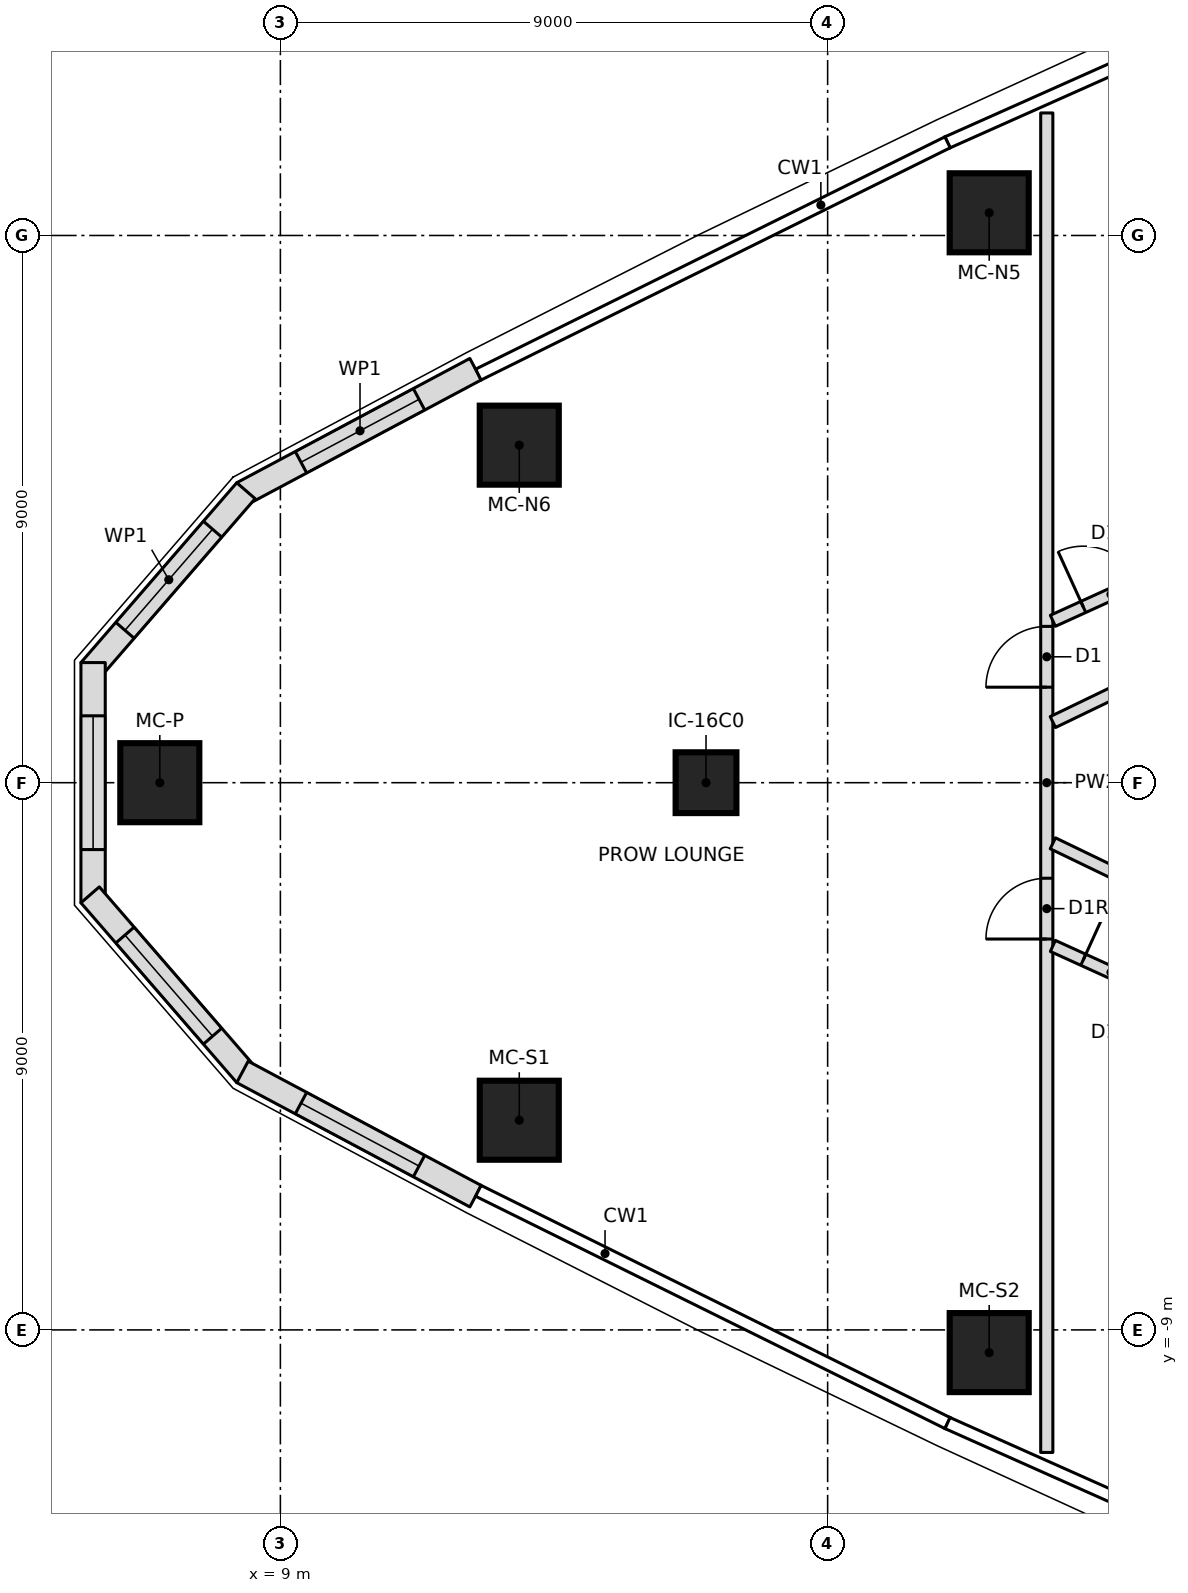
"""IFC4 building model, lengths in metres.
Left out: names, types, materials, properties, quantities, classifications, styles, units other than length and angle.
Written with IfcOpenShell. Run it as: python <this file> out.ifc"""

import sys

from ifc_helpers import new_model, si_unit, direction, frame, frame_2d, origin, origin_2d, place, context, subcontext, project, spatial, polyline, rectangle, outline, extrude, element, fill, save


model = new_model("IFC4")
c1 = context("Model", 3, precision=1e-05, world=origin(), true_north=direction((0.0, 1.0)))
c2 = subcontext(c1, "Body", "Model", "MODEL_VIEW")
j1 = project(units=[si_unit("LENGTHUNIT", "METRE"), si_unit("PLANEANGLEUNIT", "RADIAN")], contexts=[c1])
p1 = place(None, origin())
s1 = spatial("IfcSite", under=j1, at=p1, CompositionType="ELEMENT")
p2 = place(p1, origin())
s2 = spatial("IfcBuilding", under=s1, at=p2, CompositionType="ELEMENT")
p3 = place(p2, frame((0.0, 0.0, 193.25)))
s3 = spatial("IfcBuildingStorey", under=s2, at=p3, CompositionType="ELEMENT", Elevation=193.25)
for number, where, z_axis, x_axis in (
    (1, (7.017, 0.0, 0.0), (0.0, 0.0, 1.0), (1.0, 0.0, 0.0)),
    (2, (12.929, -5.552, 0.0), (0.0, 0.0, 1.0), (1.0, 0.0, 0.0)),
    (3, (20.657, -9.373, 0.0), (0.0, 0.0, 1.0), (1.0, 0.0, 0.0)),
    (4, (20.657, 9.373, 0.0), (0.0, 0.0, 1.0), (1.0, 0.0, 0.0)),
    (5, (12.929, 5.552, 0.0), (0.0, 0.0, 1.0), (1.0, 0.0, 0.0)),
):
    element("IfcColumn", number, at=place(p3, frame(where, z_axis=z_axis, x_axis=x_axis)), inside=s3, PredefinedType="COLUMN", context=c2, shape_type="SweptSolid", body=[
        extrude(rectangle(XDim=1.3, YDim=1.3, at=origin_2d()), origin(), (0.0, 0.0, 1.0), 3.55),
    ])
p4 = place(p3, frame((16.0, 0.0, 0.0), z_axis=(0.0, 0.0, 1.0), x_axis=(1.0, 0.0, 0.0)))
e6 = element("IfcColumn", 6, at=p4, inside=s3, PredefinedType="COLUMN", context=c2, shape_type="SweptSolid", body=[
    extrude(rectangle(XDim=1.0, YDim=1.0, at=origin_2d()), origin(), (0.0, 0.0, 1.0), 3.55),
])
p5 = place(p3, frame((12.21, 6.801, 0.0), z_axis=(0.0, 0.0, 1.0), x_axis=(-0.882385889746, -0.470526451518, 0.0)))
e7 = element("IfcWall", 7, at=p5, inside=s3, PredefinedType="NOTDEFINED", context=c2, shape_type="SweptSolid", body=[
    extrude(outline(polyline([(0.0, -0.2), (4.344, -0.2), (4.27, 0.2), (0.0, 0.2), (0.0, -0.2)])), origin(), (0.0, 0.0, 1.0), 3.25),
])
p6 = place(p5, frame((1.053, 0.0, 0.6)))
e8 = element("IfcOpeningElement", 8, at=p6, cuts=e7, PredefinedType="OPENING", context=c2, shape_type="SweptSolid", body=[
    extrude(outline(polyline([(0.0, 1.35), (0.084, 1.771), (0.322, 2.128), (0.679, 2.366), (1.1, 2.45), (1.521, 2.366), (1.878, 2.128), (2.116, 1.771), (2.2, 1.35), (2.2, 1.1), (2.116, 0.679), (1.878, 0.322), (1.521, 0.084), (1.1, 0.0), (0.679, 0.084), (0.322, 0.322), (0.084, 0.679), (0.0, 1.1), (0.0, 1.35)])), frame((0.0, 0.21, 0.0), z_axis=(0.0, -1.0, 0.0), x_axis=(1.0, 0.0, 0.0)), (0.0, 0.0, 1.0), 0.42),
])
p7 = place(p3, frame((8.409, 4.774, 0.0), z_axis=(0.0, 0.0, 1.0), x_axis=(-0.654759384203, -0.755837382509, 0.0)))
e9 = element("IfcWall", 9, at=p7, inside=s3, PredefinedType="NOTDEFINED", context=c2, shape_type="SweptSolid", body=[
    extrude(outline(polyline([(-0.037, -0.2), (3.876, -0.2), (3.727, 0.2), (0.037, 0.2), (-0.037, -0.2)])), origin(), (0.0, 0.0, 1.0), 3.25),
])
p8 = place(p7, frame((0.801, 0.0, 0.6)))
e10 = element("IfcOpeningElement", 10, at=p8, cuts=e9, PredefinedType="OPENING", context=c2, shape_type="SweptSolid", body=[
    extrude(outline(polyline([(0.0, 1.35), (0.084, 1.771), (0.322, 2.128), (0.679, 2.366), (1.1, 2.45), (1.521, 2.366), (1.878, 2.128), (2.116, 1.771), (2.2, 1.35), (2.2, 1.1), (2.116, 0.679), (1.878, 0.322), (1.521, 0.084), (1.1, 0.0), (0.679, 0.084), (0.322, 0.322), (0.084, 0.679), (0.0, 1.1), (0.0, 1.35)])), frame((0.0, 0.21, 0.0), z_axis=(0.0, -1.0, 0.0), x_axis=(1.0, 0.0, 0.0)), (0.0, 0.0, 1.0), 0.42),
])
p9 = place(p3, frame((5.92, 1.901, 0.0), z_axis=(0.0, 0.0, 1.0), x_axis=(0.0, -1.0, 0.0)))
e11 = element("IfcWall", 11, at=p9, inside=s3, PredefinedType="NOTDEFINED", context=c2, shape_type="SweptSolid", body=[
    extrude(outline(polyline([(-0.075, -0.2), (3.876, -0.2), (3.727, 0.2), (0.075, 0.2), (-0.075, -0.2)])), origin(), (0.0, 0.0, 1.0), 3.25),
])
p10 = place(p9, frame((0.801, 0.0, 0.6)))
e12 = element("IfcOpeningElement", 12, at=p10, cuts=e11, PredefinedType="OPENING", context=c2, shape_type="SweptSolid", body=[
    extrude(outline(polyline([(0.0, 1.35), (0.084, 1.771), (0.322, 2.128), (0.679, 2.366), (1.1, 2.45), (1.521, 2.366), (1.878, 2.128), (2.116, 1.771), (2.2, 1.35), (2.2, 1.1), (2.116, 0.679), (1.878, 0.322), (1.521, 0.084), (1.1, 0.0), (0.679, 0.084), (0.322, 0.322), (0.084, 0.679), (0.0, 1.1), (0.0, 1.35)])), frame((0.0, 0.21, 0.0), z_axis=(0.0, -1.0, 0.0), x_axis=(1.0, 0.0, 0.0)), (0.0, 0.0, 1.0), 0.42),
])
p11 = place(p3, frame((5.92, -1.901, 0.0), z_axis=(0.0, 0.0, 1.0), x_axis=(0.654759384203, -0.755837382509, 0.0)))
e13 = element("IfcWall", 13, at=p11, inside=s3, PredefinedType="NOTDEFINED", context=c2, shape_type="SweptSolid", body=[
    extrude(outline(polyline([(-0.075, -0.2), (3.839, -0.2), (3.765, 0.2), (0.075, 0.2), (-0.075, -0.2)])), origin(), (0.0, 0.0, 1.0), 3.25),
])
p12 = place(p11, frame((0.801, 0.0, 0.6)))
e14 = element("IfcOpeningElement", 14, at=p12, cuts=e13, PredefinedType="OPENING", context=c2, shape_type="SweptSolid", body=[
    extrude(outline(polyline([(0.0, 1.35), (0.084, 1.771), (0.322, 2.128), (0.679, 2.366), (1.1, 2.45), (1.521, 2.366), (1.878, 2.128), (2.116, 1.771), (2.2, 1.35), (2.2, 1.1), (2.116, 0.679), (1.878, 0.322), (1.521, 0.084), (1.1, 0.0), (0.679, 0.084), (0.322, 0.322), (0.084, 0.679), (0.0, 1.1), (0.0, 1.35)])), frame((0.0, 0.21, 0.0), z_axis=(0.0, -1.0, 0.0), x_axis=(1.0, 0.0, 0.0)), (0.0, 0.0, 1.0), 0.42),
])
p13 = place(p3, frame((8.409, -4.774, 0.0), z_axis=(0.0, 0.0, 1.0), x_axis=(0.882385889746, -0.470526451518, 0.0)))
e15 = element("IfcWall", 15, at=p13, inside=s3, PredefinedType="NOTDEFINED", context=c2, shape_type="SweptSolid", body=[
    extrude(outline(polyline([(-0.037, -0.2), (4.307, -0.2), (4.307, 0.2), (0.037, 0.2), (-0.037, -0.2)])), origin(), (0.0, 0.0, 1.0), 3.25),
])
p14 = place(p13, frame((1.053, 0.0, 0.6)))
e16 = element("IfcOpeningElement", 16, at=p14, cuts=e15, PredefinedType="OPENING", context=c2, shape_type="SweptSolid", body=[
    extrude(outline(polyline([(0.0, 1.35), (0.084, 1.771), (0.322, 2.128), (0.679, 2.366), (1.1, 2.45), (1.521, 2.366), (1.878, 2.128), (2.116, 1.771), (2.2, 1.35), (2.2, 1.1), (2.116, 0.679), (1.878, 0.322), (1.521, 0.084), (1.1, 0.0), (0.679, 0.084), (0.322, 0.322), (0.084, 0.679), (0.0, 1.1), (0.0, 1.35)])), frame((0.0, 0.21, 0.0), z_axis=(0.0, -1.0, 0.0), x_axis=(1.0, 0.0, 0.0)), (0.0, 0.0, 1.0), 0.42),
])
p15 = place(p3, frame((21.604, -11.015, 0.0), z_axis=(0.0, 0.0, 1.0), x_axis=(0.0, 1.0, 0.0)))
e17 = element("IfcWall", 17, at=p15, inside=s3, PredefinedType="PARTITIONING", context=c2, shape_type="SweptSolid", body=[
    extrude(rectangle(XDim=22.031, YDim=0.2, at=frame_2d((11.015, 0.0))), origin(), (0.0, 0.0, 1.0), 3.25),
])
p16 = place(p15, frame((12.586, 0.0, 0.0)))
e18 = element("IfcOpeningElement", 18, at=p16, cuts=e17, PredefinedType="OPENING", context=c2, shape_type="SweptSolid", body=[
    extrude(rectangle(XDim=1.0, YDim=2.1, at=frame_2d((0.5, 1.05))), frame((0.0, 0.11, 0.0), z_axis=(0.0, -1.0, 0.0), x_axis=(1.0, 0.0, 0.0)), (0.0, 0.0, 1.0), 0.22),
])
p17 = place(p15, frame((8.444, 0.0, 0.0)))
e19 = element("IfcOpeningElement", 19, at=p17, cuts=e17, PredefinedType="OPENING", context=c2, shape_type="SweptSolid", body=[
    extrude(rectangle(XDim=1.0, YDim=2.1, at=frame_2d((0.5, 1.05))), frame((0.0, 0.11, 0.0), z_axis=(0.0, -1.0, 0.0), x_axis=(1.0, 0.0, 0.0)), (0.0, 0.0, 1.0), 0.22),
])
p18 = place(p3, frame((21.704, 2.663, 0.0), z_axis=(0.0, 0.0, 1.0), x_axis=(0.910233539732, 0.414095282692, 0.0)))
e20 = element("IfcWall", 20, at=p18, inside=s3, PredefinedType="PARTITIONING", context=c2, shape_type="SweptSolid", body=[
    extrude(rectangle(XDim=8.808, YDim=0.2, at=frame_2d((4.404, 0.0))), origin(), (0.0, 0.0, 1.0), 3.25),
])
p19 = place(p18, frame((0.55, 0.0, 0.0)))
e21 = element("IfcOpeningElement", 21, at=p19, cuts=e20, PredefinedType="OPENING", context=c2, shape_type="SweptSolid", body=[
    extrude(rectangle(XDim=1.0, YDim=2.1, at=frame_2d((0.5, 1.05))), frame((0.0, 0.11, 0.0), z_axis=(0.0, -1.0, 0.0), x_axis=(1.0, 0.0, 0.0)), (0.0, 0.0, 1.0), 0.22),
])
p20 = place(p3, frame((21.704, -2.685, 0.0), z_axis=(0.0, 0.0, 1.0), x_axis=(0.910242920453, -0.414074662067, 0.0)))
e22 = element("IfcWall", 22, at=p20, inside=s3, PredefinedType="PARTITIONING", context=c2, shape_type="SweptSolid", body=[
    extrude(rectangle(XDim=8.8, YDim=0.2, at=frame_2d((4.4, 0.0))), origin(), (0.0, 0.0, 1.0), 3.25),
])
p21 = place(p20, frame((0.55, 0.0, 0.0)))
e23 = element("IfcOpeningElement", 23, at=p21, cuts=e22, PredefinedType="OPENING", context=c2, shape_type="SweptSolid", body=[
    extrude(rectangle(XDim=1.0, YDim=2.1, at=frame_2d((0.5, 1.05))), frame((0.0, 0.11, 0.0), z_axis=(0.0, -1.0, 0.0), x_axis=(1.0, 0.0, 0.0)), (0.0, 0.0, 1.0), 0.22),
])
for number, where, z_axis, x_axis in (
    (24, (23.947, -2.079, 0.0), (0.0, 0.0, 1.0), (-0.901, 0.435, 0.0)),
    (25, (21.704, 0.997, 0.0), (0.0, 0.0, 1.0), (0.901, 0.435, 0.0)),
):
    element("IfcWall", number, at=place(p3, frame(where, z_axis=z_axis, x_axis=x_axis)), inside=s3, PredefinedType="PARTITIONING", context=c2, shape_type="SweptSolid", body=[
        extrude(rectangle(XDim=2.49, YDim=0.2, at=frame_2d((1.245, 0.0))), origin(), (0.0, 0.0, 1.0), 3.25),
    ])
p22 = place(p6, origin())
e26 = element("IfcWindow", 26, at=p22, inside=s3, PartitioningType="SINGLE_PANEL", PredefinedType="WINDOW", context=c2, shape_type="SweptSolid", body=[
    extrude(outline(polyline([(0.0, 1.35), (0.084, 1.771), (0.322, 2.128), (0.679, 2.366), (1.1, 2.45), (1.521, 2.366), (1.878, 2.128), (2.116, 1.771), (2.2, 1.35), (2.2, 1.1), (2.116, 0.679), (1.878, 0.322), (1.521, 0.084), (1.1, 0.0), (0.679, 0.084), (0.322, 0.322), (0.084, 0.679), (0.0, 1.1), (0.0, 1.35)])), frame((0.0, 0.17, 0.0), z_axis=(0.0, -1.0, 0.0), x_axis=(1.0, 0.0, 0.0)), (0.0, 0.0, 1.0), 0.06),
])
fill(e8, e26)
p23 = place(p8, origin())
e27 = element("IfcWindow", 27, at=p23, inside=s3, PartitioningType="SINGLE_PANEL", PredefinedType="WINDOW", context=c2, shape_type="SweptSolid", body=[
    extrude(outline(polyline([(0.0, 1.35), (0.084, 1.771), (0.322, 2.128), (0.679, 2.366), (1.1, 2.45), (1.521, 2.366), (1.878, 2.128), (2.116, 1.771), (2.2, 1.35), (2.2, 1.1), (2.116, 0.679), (1.878, 0.322), (1.521, 0.084), (1.1, 0.0), (0.679, 0.084), (0.322, 0.322), (0.084, 0.679), (0.0, 1.1), (0.0, 1.35)])), frame((0.0, 0.17, 0.0), z_axis=(0.0, -1.0, 0.0), x_axis=(1.0, 0.0, 0.0)), (0.0, 0.0, 1.0), 0.06),
])
fill(e10, e27)
p24 = place(p10, origin())
e28 = element("IfcWindow", 28, at=p24, inside=s3, PartitioningType="SINGLE_PANEL", PredefinedType="WINDOW", context=c2, shape_type="SweptSolid", body=[
    extrude(outline(polyline([(0.0, 1.35), (0.084, 1.771), (0.322, 2.128), (0.679, 2.366), (1.1, 2.45), (1.521, 2.366), (1.878, 2.128), (2.116, 1.771), (2.2, 1.35), (2.2, 1.1), (2.116, 0.679), (1.878, 0.322), (1.521, 0.084), (1.1, 0.0), (0.679, 0.084), (0.322, 0.322), (0.084, 0.679), (0.0, 1.1), (0.0, 1.35)])), frame((0.0, 0.17, 0.0), z_axis=(0.0, -1.0, 0.0), x_axis=(1.0, 0.0, 0.0)), (0.0, 0.0, 1.0), 0.06),
])
fill(e12, e28)
p25 = place(p12, origin())
e29 = element("IfcWindow", 29, at=p25, inside=s3, PartitioningType="SINGLE_PANEL", PredefinedType="WINDOW", context=c2, shape_type="SweptSolid", body=[
    extrude(outline(polyline([(0.0, 1.35), (0.084, 1.771), (0.322, 2.128), (0.679, 2.366), (1.1, 2.45), (1.521, 2.366), (1.878, 2.128), (2.116, 1.771), (2.2, 1.35), (2.2, 1.1), (2.116, 0.679), (1.878, 0.322), (1.521, 0.084), (1.1, 0.0), (0.679, 0.084), (0.322, 0.322), (0.084, 0.679), (0.0, 1.1), (0.0, 1.35)])), frame((0.0, 0.17, 0.0), z_axis=(0.0, -1.0, 0.0), x_axis=(1.0, 0.0, 0.0)), (0.0, 0.0, 1.0), 0.06),
])
fill(e14, e29)
p26 = place(p14, origin())
e30 = element("IfcWindow", 30, at=p26, inside=s3, PartitioningType="SINGLE_PANEL", PredefinedType="WINDOW", context=c2, shape_type="SweptSolid", body=[
    extrude(outline(polyline([(0.0, 1.35), (0.084, 1.771), (0.322, 2.128), (0.679, 2.366), (1.1, 2.45), (1.521, 2.366), (1.878, 2.128), (2.116, 1.771), (2.2, 1.35), (2.2, 1.1), (2.116, 0.679), (1.878, 0.322), (1.521, 0.084), (1.1, 0.0), (0.679, 0.084), (0.322, 0.322), (0.084, 0.679), (0.0, 1.1), (0.0, 1.35)])), frame((0.0, 0.17, 0.0), z_axis=(0.0, -1.0, 0.0), x_axis=(1.0, 0.0, 0.0)), (0.0, 0.0, 1.0), 0.06),
])
fill(e16, e30)
p27 = place(p16, origin())
e31 = element("IfcDoor", 31, at=p27, inside=s3, OperationType="SINGLE_SWING_LEFT", PredefinedType="DOOR", context=c2, shape_type="SweptSolid", body=[
    extrude(rectangle(XDim=1.0, YDim=2.1, at=frame_2d((0.5, 1.05))), frame((0.0, 0.025, 0.0), z_axis=(0.0, -1.0, 0.0), x_axis=(1.0, 0.0, 0.0)), (0.0, 0.0, 1.0), 0.05),
])
fill(e18, e31)
p28 = place(p17, origin())
e32 = element("IfcDoor", 32, at=p28, inside=s3, OperationType="SINGLE_SWING_RIGHT", PredefinedType="DOOR", context=c2, shape_type="SweptSolid", body=[
    extrude(rectangle(XDim=1.0, YDim=2.1, at=frame_2d((0.5, 1.05))), frame((0.0, 0.025, 0.0), z_axis=(0.0, -1.0, 0.0), x_axis=(1.0, 0.0, 0.0)), (0.0, 0.0, 1.0), 0.05),
])
fill(e19, e32)
p29 = place(p19, origin())
e33 = element("IfcDoor", 33, at=p29, inside=s3, OperationType="SINGLE_SWING_RIGHT", PredefinedType="DOOR", context=c2, shape_type="SweptSolid", body=[
    extrude(rectangle(XDim=1.0, YDim=2.1, at=frame_2d((0.5, 1.05))), frame((0.0, 0.025, 0.0), z_axis=(0.0, -1.0, 0.0), x_axis=(1.0, 0.0, 0.0)), (0.0, 0.0, 1.0), 0.05),
])
fill(e21, e33)
p30 = place(p21, origin())
e34 = element("IfcDoor", 34, at=p30, inside=s3, OperationType="SINGLE_SWING_RIGHT", PredefinedType="DOOR", context=c2, shape_type="SweptSolid", body=[
    extrude(rectangle(XDim=1.0, YDim=2.1, at=frame_2d((0.5, 1.05))), frame((0.0, 0.025, 0.0), z_axis=(0.0, -1.0, 0.0), x_axis=(1.0, 0.0, 0.0)), (0.0, 0.0, 1.0), 0.05),
])
fill(e23, e34)
save(model, sys.argv[1])
